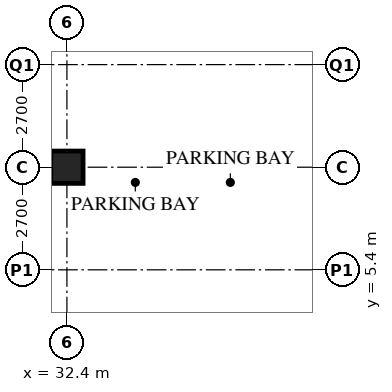
"""IFC4 building model, lengths in metres.
Left out: names, types, materials, properties, quantities, classifications, styles, units other than length and angle.
Written with IfcOpenShell. Run it as: python <this file> out.ifc"""

import sys

from ifc_helpers import new_model, si_unit, direction, frame, origin, origin_2d, place, context, subcontext, project, spatial, hollow_rectangle, extrude, element, save


model = new_model("IFC4")
c1 = context("Model", 3, precision=1e-05, world=origin(), true_north=direction((0.0, 1.0)))
c2 = subcontext(c1, "Body", "Model", "MODEL_VIEW")
j1 = project(units=[si_unit("LENGTHUNIT", "METRE"), si_unit("PLANEANGLEUNIT", "RADIAN")], contexts=[c1])
p1 = place(None, origin())
s1 = spatial("IfcSite", under=j1, at=p1, CompositionType="ELEMENT")
p2 = place(p1, origin())
s2 = spatial("IfcBuilding", under=s1, at=p2, CompositionType="ELEMENT")
p3 = place(p2, frame((0.0, 0.0, -4.2)))
s3 = spatial("IfcBuildingStorey", under=s2, at=p3, CompositionType="ELEMENT", Elevation=-4.2)
p4 = place(p3, frame((32.4, 8.1, 0.0), z_axis=(0.0, 0.0, 1.0), x_axis=(1.0, 0.0, 0.0)))
e1 = element("IfcColumn", 1, at=p4, inside=s3, PredefinedType="COLUMN", context=c2, shape_type="SweptSolid", body=[
    extrude(hollow_rectangle(XDim=0.85, YDim=0.85, WallThickness=0.085, at=origin_2d()), origin(), (0.0, 0.0, 1.0), 4.2),
])
save(model, sys.argv[1])
